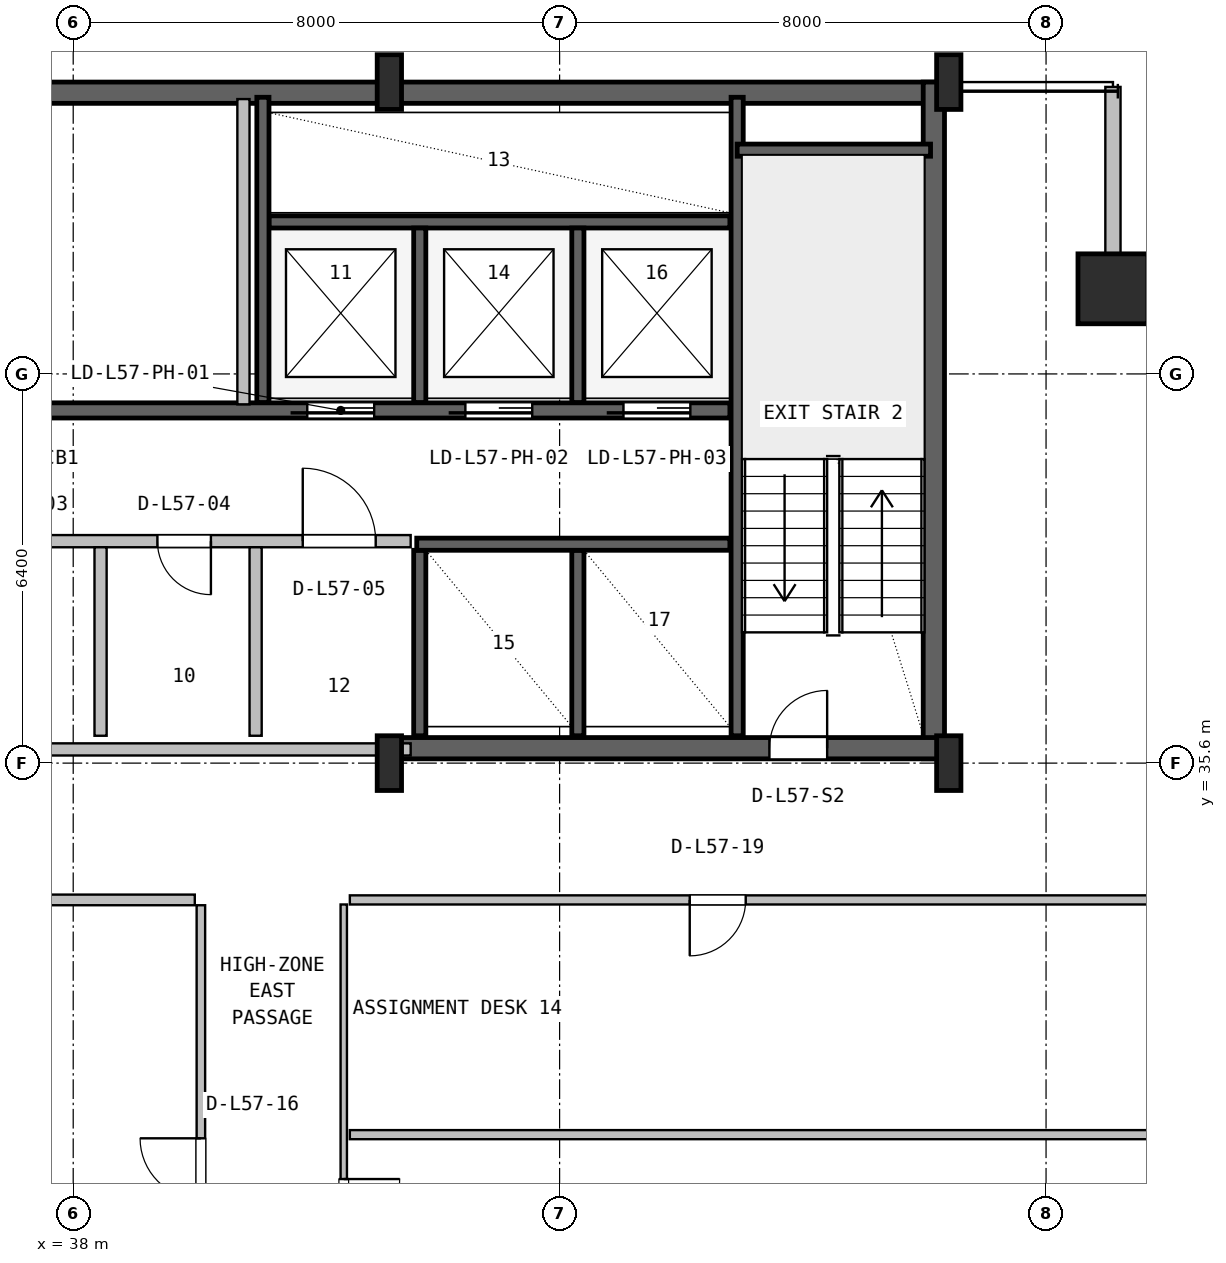
"""IFC4 building model, lengths in metres.
Left out: names, types, materials, properties, quantities, classifications, styles, units other than length and angle.
Written with IfcOpenShell. Run it as: python <this file> out.ifc"""

import sys

from ifc_helpers import new_model, si_unit, direction, frame, frame_2d, origin, origin_2d, place, context, subcontext, project, spatial, rectangle, hollow_rectangle, i_section, extrude, source, transform, mapped, element, fill, save


model = new_model("IFC4")
c1 = context("Model", 3, precision=1e-05, world=origin(), true_north=direction((0.0, 1.0)))
c2 = subcontext(c1, "Body", "Model", "MODEL_VIEW")
j1 = project(units=[si_unit("LENGTHUNIT", "METRE"), si_unit("PLANEANGLEUNIT", "RADIAN")], contexts=[c1])
p1 = place(None, origin())
s1 = spatial("IfcSite", under=j1, at=p1, CompositionType="ELEMENT")
p2 = place(p1, origin())
s2 = spatial("IfcBuilding", under=s1, at=p2, CompositionType="ELEMENT")
p3 = place(p2, frame((0.0, 0.0, 230.2)))
s3 = spatial("IfcBuildingStorey", under=s2, at=p3, CompositionType="ELEMENT", Elevation=230.2)
p4 = place(p3, frame((15.6, 46.625, 0.0), z_axis=(0.0, 0.0, 1.0), x_axis=(1.0, 0.0, 0.0)))
e1 = element("IfcWall", 1, at=p4, inside=s3, PredefinedType="SHEAR", context=c2, shape_type="SweptSolid", body=[
    extrude(rectangle(XDim=36.8, YDim=0.35, at=frame_2d((18.4, 0.0))), origin(), (0.0, 0.0, 1.0), 3.48),
])
p5 = place(p3, frame((52.155, 35.67, 0.0), z_axis=(0.0, 0.0, 1.0), x_axis=(0.0, 1.0, 0.0)))
e2 = element("IfcWall", 2, at=p5, inside=s3, PredefinedType="SHEAR", context=c2, shape_type="SweptSolid", body=[
    extrude(rectangle(XDim=11.13, YDim=0.35, at=frame_2d((5.565, 0.0))), origin(), (0.0, 0.0, 1.0), 3.48),
])
p6 = place(p3, frame((43.2, 35.845, 0.0), z_axis=(0.0, 0.0, 1.0), x_axis=(1.0, 0.0, 0.0)))
e3 = element("IfcWall", 3, at=p6, inside=s3, PredefinedType="SHEAR", context=c2, shape_type="SweptSolid", body=[
    extrude(rectangle(XDim=9.13, YDim=0.35, at=frame_2d((4.565, 0.0))), origin(), (0.0, 0.0, 1.0), 3.48),
])
p7 = place(p6, frame((6.25, 0.0, 0.0)))
e4 = element("IfcOpeningElement", 4, at=p7, cuts=e3, PredefinedType="OPENING", context=c2, shape_type="SweptSolid", body=[
    extrude(rectangle(XDim=0.95, YDim=2.1, at=frame_2d((0.475, 1.05))), frame((0.0, 0.185, 0.0), z_axis=(0.0, -1.0, 0.0), x_axis=(1.0, 0.0, 0.0)), (0.0, 0.0, 1.0), 0.37),
])
m1 = source(origin(), c2, "Body", "SweptSolid", [
    extrude(i_section(OverallWidth=0.4, OverallDepth=0.9, WebThickness=0.016, FlangeThickness=0.028, FilletRadius=0.016, at=origin_2d()), origin(), (0.0, 0.0, 1.0), 3.8),
])
for number, where, z_axis, x_axis in (
    (5, (43.2, 35.6, 0.0), (0.0, 0.0, 1.0), (1.0, 0.0, 0.0)),
    (6, (43.2, 46.8, 0.0), (0.0, 0.0, 1.0), (1.0, 0.0, 0.0)),
    (7, (52.4, 35.6, 0.0), (0.0, 0.0, 1.0), (1.0, 0.0, 0.0)),
    (8, (52.4, 46.8, 0.0), (0.0, 0.0, 1.0), (1.0, 0.0, 0.0)),
):
    element("IfcColumn", number, at=place(p3, frame(where, z_axis=z_axis, x_axis=x_axis)), inside=s3, PredefinedType="COLUMN", context=c2, shape_type="MappedRepresentation", body=[
        mapped(m1, transform((0.0, 0.0, 0.0), x_axis=(1.0, 0.0, 0.0), y_axis=(0.0, 1.0, 0.0), z_axis=(0.0, 0.0, 1.0), scale=1.0)),
    ])
m2 = source(origin(), c2, "Body", "SweptSolid", [
    extrude(hollow_rectangle(XDim=1.15, YDim=1.15, WallThickness=0.045, at=origin_2d()), origin(), (0.0, 0.0, 1.0), 3.8),
])
p8 = place(p3, frame((55.1, 43.4, 0.0), z_axis=(0.0, 0.0, 1.0), x_axis=(1.0, 0.0, 0.0)))
e9 = element("IfcColumn", 9, at=p8, inside=s3, PredefinedType="COLUMN", context=c2, shape_type="MappedRepresentation", body=[
    mapped(m2, transform((0.0, 0.0, 0.0), x_axis=(1.0, 0.0, 0.0), y_axis=(0.0, 1.0, 0.0), z_axis=(0.0, 0.0, 1.0), scale=1.0)),
])
p9 = place(p3, frame((55.23, 43.4, 0.0), z_axis=(0.0, 0.0, 1.0), x_axis=(1.0, 0.0, 0.0)))
e10 = element("IfcWall", 10, at=p9, inside=s3, PredefinedType="SOLIDWALL", context=c2, shape_type="SweptSolid", body=[
    extrude(rectangle(XDim=3.19, YDim=0.25, at=frame_2d((1.595, 0.0))), origin(), (0.0, 0.0, 1.0), 3.46),
])
p10 = place(p3, frame((55.1, 43.32, 0.0), z_axis=(0.0, 0.0, 1.0), x_axis=(0.0, 1.0, 0.0)))
e11 = element("IfcWall", 11, at=p10, inside=s3, PredefinedType="SOLIDWALL", context=c2, shape_type="SweptSolid", body=[
    extrude(rectangle(XDim=3.4, YDim=0.25, at=frame_2d((1.7, 0.0))), origin(), (0.0, 0.0, 1.0), 3.101),
])
p11 = place(p3, frame((48.92, 36.05, 0.0), z_axis=(0.0, 0.0, 1.0), x_axis=(0.0, 1.0, 0.0)))
e12 = element("IfcWall", 12, at=p11, inside=s3, PredefinedType="SHEAR", context=c2, shape_type="SweptSolid", body=[
    extrude(rectangle(XDim=10.5, YDim=0.2, at=frame_2d((5.25, 0.0))), origin(), (0.0, 0.0, 1.0), 3.48),
])
p12 = place(p3, frame((48.92, 45.68, 0.0), z_axis=(0.0, 0.0, 1.0), x_axis=(1.0, 0.0, 0.0)))
e13 = element("IfcWall", 13, at=p12, inside=s3, PredefinedType="SHEAR", context=c2, shape_type="SweptSolid", body=[
    extrude(rectangle(XDim=3.18, YDim=0.2, at=frame_2d((1.59, 0.0))), origin(), (0.0, 0.0, 1.0), 3.48),
])
p13 = place(p3, frame((24.98, 41.4, 0.0), z_axis=(0.0, 0.0, 1.0), x_axis=(1.0, 0.0, 0.0)))
e14 = element("IfcWall", 14, at=p13, inside=s3, PredefinedType="SHEAR", context=c2, shape_type="SweptSolid", body=[
    extrude(rectangle(XDim=23.82, YDim=0.25, at=frame_2d((11.91, 0.0))), origin(), (0.0, 0.0, 1.0), 3.48),
])
p14 = place(p13, frame((16.87, 0.0, 0.0)))
e15 = element("IfcOpeningElement", 15, at=p14, cuts=e14, PredefinedType="OPENING", context=c2, shape_type="SweptSolid", body=[
    extrude(rectangle(XDim=1.1, YDim=2.18, at=frame_2d((0.55, 1.09))), frame((0.0, 0.135, 0.0), z_axis=(0.0, -1.0, 0.0), x_axis=(1.0, 0.0, 0.0)), (0.0, 0.0, 1.0), 0.27),
])
p15 = place(p13, frame((19.47, 0.0, 0.0)))
e16 = element("IfcOpeningElement", 16, at=p15, cuts=e14, PredefinedType="OPENING", context=c2, shape_type="SweptSolid", body=[
    extrude(rectangle(XDim=1.1, YDim=2.18, at=frame_2d((0.55, 1.09))), frame((0.0, 0.135, 0.0), z_axis=(0.0, -1.0, 0.0), x_axis=(1.0, 0.0, 0.0)), (0.0, 0.0, 1.0), 0.27),
])
p16 = place(p13, frame((22.07, 0.0, 0.0)))
e17 = element("IfcOpeningElement", 17, at=p16, cuts=e14, PredefinedType="OPENING", context=c2, shape_type="SweptSolid", body=[
    extrude(rectangle(XDim=1.1, YDim=2.18, at=frame_2d((0.55, 1.09))), frame((0.0, 0.135, 0.0), z_axis=(0.0, -1.0, 0.0), x_axis=(1.0, 0.0, 0.0)), (0.0, 0.0, 1.0), 0.27),
])
p17 = place(p13, frame((0.96, 0.0, 0.0)))
e18 = element("IfcOpeningElement", 18, at=p17, cuts=e14, PredefinedType="OPENING", context=c2, shape_type="SweptSolid", body=[
    extrude(rectangle(XDim=1.0, YDim=2.08, at=frame_2d((0.5, 1.04))), frame((0.0, 0.135, 0.0), z_axis=(0.0, -1.0, 0.0), x_axis=(1.0, 0.0, 0.0)), (0.0, 0.0, 1.0), 0.27),
])
p18 = place(p13, frame((3.56, 0.0, 0.0)))
e19 = element("IfcOpeningElement", 19, at=p18, cuts=e14, PredefinedType="OPENING", context=c2, shape_type="SweptSolid", body=[
    extrude(rectangle(XDim=1.0, YDim=2.08, at=frame_2d((0.5, 1.04))), frame((0.0, 0.135, 0.0), z_axis=(0.0, -1.0, 0.0), x_axis=(1.0, 0.0, 0.0)), (0.0, 0.0, 1.0), 0.27),
])
p19 = place(p13, frame((6.16, 0.0, 0.0)))
e20 = element("IfcOpeningElement", 20, at=p19, cuts=e14, PredefinedType="OPENING", context=c2, shape_type="SweptSolid", body=[
    extrude(rectangle(XDim=0.92, YDim=2.08, at=frame_2d((0.46, 1.04))), frame((0.0, 0.135, 0.0), z_axis=(0.0, -1.0, 0.0), x_axis=(1.0, 0.0, 0.0)), (0.0, 0.0, 1.0), 0.27),
])
p20 = place(p13, frame((11.56, 0.0, 0.0)))
e21 = element("IfcOpeningElement", 21, at=p20, cuts=e14, PredefinedType="OPENING", context=c2, shape_type="SweptSolid", body=[
    extrude(rectangle(XDim=1.0, YDim=2.08, at=frame_2d((0.5, 1.04))), frame((0.0, 0.135, 0.0), z_axis=(0.0, -1.0, 0.0), x_axis=(1.0, 0.0, 0.0)), (0.0, 0.0, 1.0), 0.27),
])
p21 = place(p3, frame((41.22, 44.5, 0.0), z_axis=(0.0, 0.0, 1.0), x_axis=(1.0, 0.0, 0.0)))
e22 = element("IfcWall", 22, at=p21, inside=s3, PredefinedType="SHEAR", context=c2, shape_type="SweptSolid", body=[
    extrude(rectangle(XDim=7.58, YDim=0.2, at=frame_2d((3.79, 0.0))), origin(), (0.0, 0.0, 1.0), 3.48),
])
p22 = place(p3, frame((41.12, 41.53, 0.0), z_axis=(0.0, 0.0, 1.0), x_axis=(0.0, 1.0, 0.0)))
e23 = element("IfcWall", 23, at=p22, inside=s3, PredefinedType="SHEAR", context=c2, shape_type="SweptSolid", body=[
    extrude(rectangle(XDim=5.02, YDim=0.2, at=frame_2d((2.51, 0.0))), origin(), (0.0, 0.0, 1.0), 3.48),
])
for number, where, z_axis, x_axis in (
    (24, (43.7, 41.53, 0.0), (0.0, 0.0, 1.0), (0.0, 1.0, 0.0)),
    (25, (46.3, 41.53, 0.0), (0.0, 0.0, 1.0), (0.0, 1.0, 0.0)),
):
    element("IfcWall", number, at=place(p3, frame(where, z_axis=z_axis, x_axis=x_axis)), inside=s3, PredefinedType="SHEAR", context=c2, shape_type="SweptSolid", body=[
        extrude(rectangle(XDim=2.87, YDim=0.2, at=frame_2d((1.435, 0.0))), origin(), (0.0, 0.0, 1.0), 3.48),
    ])
for number, where, z_axis, x_axis in (
    (26, (43.7, 36.05, 0.0), (0.0, 0.0, 1.0), (0.0, 1.0, 0.0)),
    (27, (46.3, 36.05, 0.0), (0.0, 0.0, 1.0), (0.0, 1.0, 0.0)),
):
    element("IfcWall", number, at=place(p3, frame(where, z_axis=z_axis, x_axis=x_axis)), inside=s3, PredefinedType="SHEAR", context=c2, shape_type="SweptSolid", body=[
        extrude(rectangle(XDim=3.05, YDim=0.2, at=frame_2d((1.525, 0.0))), origin(), (0.0, 0.0, 1.0), 3.48),
    ])
p23 = place(p3, frame((43.65, 39.2, 0.0), z_axis=(0.0, 0.0, 1.0), x_axis=(1.0, 0.0, 0.0)))
e28 = element("IfcWall", 28, at=p23, inside=s3, PredefinedType="SHEAR", context=c2, shape_type="SweptSolid", body=[
    extrude(rectangle(XDim=5.15, YDim=0.2, at=frame_2d((2.575, 0.0))), origin(), (0.0, 0.0, 1.0), 3.48),
])
p24 = place(p3, frame((29.85, 35.825, 0.0), z_axis=(0.0, 0.0, 1.0), x_axis=(1.0, 0.0, 0.0)))
e29 = element("IfcWall", 29, at=p24, inside=s3, PredefinedType="SOLIDWALL", context=c2, shape_type="SweptSolid", body=[
    extrude(rectangle(XDim=13.7, YDim=0.2, at=frame_2d((6.85, 0.0))), origin(), (0.0, 0.0, 1.0), 2.505),
])
p25 = place(p3, frame((29.85, 39.25, 0.0), z_axis=(0.0, 0.0, 1.0), x_axis=(1.0, 0.0, 0.0)))
e30 = element("IfcWall", 30, at=p25, inside=s3, PredefinedType="SOLIDWALL", context=c2, shape_type="SweptSolid", body=[
    extrude(rectangle(XDim=13.7, YDim=0.2, at=frame_2d((6.85, 0.0))), origin(), (0.0, 0.0, 1.0), 3.46),
])
p26 = place(p25, frame((1.05, 0.0, 0.0)))
e31 = element("IfcOpeningElement", 31, at=p26, cuts=e30, PredefinedType="OPENING", context=c2, shape_type="SweptSolid", body=[
    extrude(rectangle(XDim=0.9, YDim=2.06, at=frame_2d((0.45, 1.03))), frame((0.0, 0.11, 0.0), z_axis=(0.0, -1.0, 0.0), x_axis=(1.0, 0.0, 0.0)), (0.0, 0.0, 1.0), 0.22),
])
p27 = place(p25, frame((4.05, 0.0, 0.0)))
e32 = element("IfcOpeningElement", 32, at=p27, cuts=e30, PredefinedType="OPENING", context=c2, shape_type="SweptSolid", body=[
    extrude(rectangle(XDim=0.9, YDim=2.06, at=frame_2d((0.45, 1.03))), frame((0.0, 0.11, 0.0), z_axis=(0.0, -1.0, 0.0), x_axis=(1.0, 0.0, 0.0)), (0.0, 0.0, 1.0), 0.22),
])
p28 = place(p25, frame((6.85, 0.0, 0.0)))
e33 = element("IfcOpeningElement", 33, at=p28, cuts=e30, PredefinedType="OPENING", context=c2, shape_type="SweptSolid", body=[
    extrude(rectangle(XDim=0.9, YDim=2.06, at=frame_2d((0.45, 1.03))), frame((0.0, 0.11, 0.0), z_axis=(0.0, -1.0, 0.0), x_axis=(1.0, 0.0, 0.0)), (0.0, 0.0, 1.0), 0.22),
])
p29 = place(p25, frame((9.535, 0.0, 0.0)))
e34 = element("IfcOpeningElement", 34, at=p29, cuts=e30, PredefinedType="OPENING", context=c2, shape_type="SweptSolid", body=[
    extrude(rectangle(XDim=0.88, YDim=2.06, at=frame_2d((0.44, 1.03))), frame((0.0, 0.11, 0.0), z_axis=(0.0, -1.0, 0.0), x_axis=(1.0, 0.0, 0.0)), (0.0, 0.0, 1.0), 0.22),
])
p30 = place(p25, frame((11.925, 0.0, 0.0)))
e35 = element("IfcOpeningElement", 35, at=p30, cuts=e30, PredefinedType="OPENING", context=c2, shape_type="SweptSolid", body=[
    extrude(rectangle(XDim=1.2, YDim=2.1, at=frame_2d((0.6, 1.05))), frame((0.0, 0.11, 0.0), z_axis=(0.0, -1.0, 0.0), x_axis=(1.0, 0.0, 0.0)), (0.0, 0.0, 1.0), 0.22),
])
p31 = place(p3, frame((38.45, 36.05, 0.0), z_axis=(0.0, 0.0, 1.0), x_axis=(0.0, 1.0, 0.0)))
e36 = element("IfcWall", 36, at=p31, inside=s3, PredefinedType="PLUMBINGWALL", context=c2, shape_type="SweptSolid", body=[
    extrude(rectangle(XDim=3.1, YDim=0.2, at=frame_2d((1.55, 0.0))), origin(), (0.0, 0.0, 1.0), 3.46),
])
p32 = place(p3, frame((41.0, 36.05, 0.0), z_axis=(0.0, 0.0, 1.0), x_axis=(0.0, 1.0, 0.0)))
e37 = element("IfcWall", 37, at=p32, inside=s3, PredefinedType="SOLIDWALL", context=c2, shape_type="SweptSolid", body=[
    extrude(rectangle(XDim=3.1, YDim=0.2, at=frame_2d((1.55, 0.0))), origin(), (0.0, 0.0, 1.0), 3.46),
])
p33 = place(p3, frame((28.5, 33.35, 0.0), z_axis=(0.0, 0.0, 1.0), x_axis=(1.0, 0.0, 0.0)))
e38 = element("IfcWall", 38, at=p33, inside=s3, PredefinedType="PARTITIONING", context=c2, shape_type="SweptSolid", body=[
    extrude(rectangle(XDim=11.5, YDim=0.175, at=frame_2d((5.75, 0.0))), origin(), (0.0, 0.0, 1.0), 2.838),
])
p34 = place(p3, frame((40.1, 24.598, 0.0), z_axis=(0.0, 0.0, 1.0), x_axis=(0.0, 1.0, 0.0)))
e39 = element("IfcWall", 39, at=p34, inside=s3, PredefinedType="PARTITIONING", context=c2, shape_type="SweptSolid", body=[
    extrude(rectangle(XDim=8.665, YDim=0.14, at=frame_2d((4.333, 0.0))), origin(), (0.0, 0.0, 1.0), 3.152),
])
p35 = place(p34, frame((3.832, 0.0, 0.0)))
e40 = element("IfcOpeningElement", 40, at=p35, cuts=e39, PredefinedType="OPENING", context=c2, shape_type="SweptSolid", body=[
    extrude(rectangle(XDim=1.0, YDim=2.1, at=frame_2d((0.5, 1.05))), frame((0.0, 0.08, 0.0), z_axis=(0.0, -1.0, 0.0), x_axis=(1.0, 0.0, 0.0)), (0.0, 0.0, 1.0), 0.16),
])
p36 = place(p3, frame((42.45, 22.235, 0.0), z_axis=(0.0, 0.0, 1.0), x_axis=(0.0, 1.0, 0.0)))
e41 = element("IfcWall", 41, at=p36, inside=s3, PredefinedType="PARTITIONING", context=c2, shape_type="SweptSolid", body=[
    extrude(rectangle(XDim=11.04, YDim=0.105, at=frame_2d((5.52, 0.0))), origin(), (0.0, 0.0, 1.0), 2.838),
])
p37 = place(p36, frame((2.57, 0.0, 0.0)))
e42 = element("IfcOpeningElement", 42, at=p37, cuts=e41, PredefinedType="OPENING", context=c2, shape_type="SweptSolid", body=[
    extrude(rectangle(XDim=0.88, YDim=2.06, at=frame_2d((0.44, 1.03))), frame((0.0, 0.062, 0.0), z_axis=(0.0, -1.0, 0.0), x_axis=(1.0, 0.0, 0.0)), (0.0, 0.0, 1.0), 0.125),
])
p38 = place(p36, frame((5.605, 0.0, 0.0)))
e43 = element("IfcOpeningElement", 43, at=p38, cuts=e41, PredefinedType="OPENING", context=c2, shape_type="SweptSolid", body=[
    extrude(rectangle(XDim=0.92, YDim=2.08, at=frame_2d((0.46, 1.04))), frame((0.0, 0.062, 0.0), z_axis=(0.0, -1.0, 0.0), x_axis=(1.0, 0.0, 0.0)), (0.0, 0.0, 1.0), 0.125),
])
p39 = place(p3, frame((42.55, 29.49, 0.0), z_axis=(0.0, 0.0, 1.0), x_axis=(1.0, 0.0, 0.0)))
e44 = element("IfcWall", 44, at=p39, inside=s3, PredefinedType="PARTITIONING", context=c2, shape_type="SweptSolid", body=[
    extrude(rectangle(XDim=15.77, YDim=0.15, at=frame_2d((7.885, 0.0))), origin(), (0.0, 0.0, 1.0), 2.838),
])
p40 = place(p3, frame((42.55, 33.35, 0.0), z_axis=(0.0, 0.0, 1.0), x_axis=(1.0, 0.0, 0.0)))
e45 = element("IfcWall", 45, at=p40, inside=s3, PredefinedType="PARTITIONING", context=c2, shape_type="SweptSolid", body=[
    extrude(rectangle(XDim=15.77, YDim=0.15, at=frame_2d((7.885, 0.0))), origin(), (0.0, 0.0, 1.0), 2.838),
])
p41 = place(p40, frame((5.59, 0.0, 0.0)))
e46 = element("IfcOpeningElement", 46, at=p41, cuts=e45, PredefinedType="OPENING", context=c2, shape_type="SweptSolid", body=[
    extrude(rectangle(XDim=0.92, YDim=2.08, at=frame_2d((0.46, 1.04))), frame((0.0, 0.085, 0.0), z_axis=(0.0, -1.0, 0.0), x_axis=(1.0, 0.0, 0.0)), (0.0, 0.0, 1.0), 0.17),
])
p42 = place(p3, frame((40.8, 41.5, 0.0), z_axis=(0.0, 0.0, 1.0), x_axis=(0.0, 1.0, 0.0)))
e47 = element("IfcWall", 47, at=p42, inside=s3, PredefinedType="SOLIDWALL", context=c2, shape_type="SweptSolid", body=[
    extrude(rectangle(XDim=5.02, YDim=0.2, at=frame_2d((2.51, 0.0))), origin(), (0.0, 0.0, 1.0), 3.46),
])
m3 = source(origin(), c2, "Body", "SweptSolid", [
    extrude(rectangle(XDim=0.95, YDim=2.1, at=frame_2d((0.475, 1.05))), frame((0.0, 0.025, 0.0), z_axis=(0.0, -1.0, 0.0), x_axis=(1.0, 0.0, 0.0)), (0.0, 0.0, 1.0), 0.05),
])
p43 = place(p7, origin())
e48 = element("IfcDoor", 48, at=p43, inside=s3, OperationType="SINGLE_SWING_RIGHT", PredefinedType="DOOR", context=c2, shape_type="MappedRepresentation", body=[
    mapped(m3, transform((0.0, 0.0, 0.0), x_axis=(1.0, 0.0, 0.0), y_axis=(0.0, 1.0, 0.0), z_axis=(0.0, 0.0, 1.0), scale=1.0)),
])
fill(e4, e48)
m4 = source(origin(), c2, "Body", "SweptSolid", [
    extrude(rectangle(XDim=1.1, YDim=2.18, at=frame_2d((0.55, 1.09))), frame((0.0, 0.025, 0.0), z_axis=(0.0, -1.0, 0.0), x_axis=(1.0, 0.0, 0.0)), (0.0, 0.0, 1.0), 0.05),
])
p44 = place(p14, frame((1.1, 0.0, 0.0), z_axis=(0.0, 0.0, 1.0), x_axis=(-1.0, 0.0, 0.0)))
e49 = element("IfcDoor", 49, at=p44, inside=s3, OperationType="SLIDING_TO_LEFT", PredefinedType="DOOR", context=c2, shape_type="MappedRepresentation", body=[
    mapped(m4, transform((0.0, 0.0, 0.0), x_axis=(1.0, 0.0, 0.0), y_axis=(0.0, 1.0, 0.0), z_axis=(0.0, 0.0, 1.0), scale=1.0)),
])
fill(e15, e49)
p45 = place(p15, frame((1.1, 0.0, 0.0), z_axis=(0.0, 0.0, 1.0), x_axis=(-1.0, 0.0, 0.0)))
e50 = element("IfcDoor", 50, at=p45, inside=s3, OperationType="SLIDING_TO_LEFT", PredefinedType="DOOR", context=c2, shape_type="MappedRepresentation", body=[
    mapped(m4, transform((0.0, 0.0, 0.0), x_axis=(1.0, 0.0, 0.0), y_axis=(0.0, 1.0, 0.0), z_axis=(0.0, 0.0, 1.0), scale=1.0)),
])
fill(e16, e50)
p46 = place(p16, frame((1.1, 0.0, 0.0), z_axis=(0.0, 0.0, 1.0), x_axis=(-1.0, 0.0, 0.0)))
e51 = element("IfcDoor", 51, at=p46, inside=s3, OperationType="SLIDING_TO_LEFT", PredefinedType="DOOR", context=c2, shape_type="MappedRepresentation", body=[
    mapped(m4, transform((0.0, 0.0, 0.0), x_axis=(1.0, 0.0, 0.0), y_axis=(0.0, 1.0, 0.0), z_axis=(0.0, 0.0, 1.0), scale=1.0)),
])
fill(e17, e51)
m5 = source(origin(), c2, "Body", "SweptSolid", [
    extrude(rectangle(XDim=0.88, YDim=2.06, at=frame_2d((0.44, 1.03))), frame((0.0, 0.025, 0.0), z_axis=(0.0, -1.0, 0.0), x_axis=(1.0, 0.0, 0.0)), (0.0, 0.0, 1.0), 0.05),
])
p47 = place(p29, frame((0.88, 0.0, 0.0), z_axis=(0.0, 0.0, 1.0), x_axis=(-1.0, 0.0, 0.0)))
e52 = element("IfcDoor", 52, at=p47, inside=s3, OperationType="SINGLE_SWING_RIGHT", PredefinedType="DOOR", context=c2, shape_type="MappedRepresentation", body=[
    mapped(m5, transform((0.0, 0.0, 0.0), x_axis=(1.0, 0.0, 0.0), y_axis=(0.0, 1.0, 0.0), z_axis=(0.0, 0.0, 1.0), scale=1.0)),
])
fill(e34, e52)
m6 = source(origin(), c2, "Body", "SweptSolid", [
    extrude(rectangle(XDim=1.2, YDim=2.1, at=frame_2d((0.6, 1.05))), frame((0.0, 0.025, 0.0), z_axis=(0.0, -1.0, 0.0), x_axis=(1.0, 0.0, 0.0)), (0.0, 0.0, 1.0), 0.05),
])
p48 = place(p30, origin())
e53 = element("IfcDoor", 53, at=p48, inside=s3, OperationType="SINGLE_SWING_LEFT", PredefinedType="DOOR", context=c2, shape_type="MappedRepresentation", body=[
    mapped(m6, transform((0.0, 0.0, 0.0), x_axis=(1.0, 0.0, 0.0), y_axis=(0.0, 1.0, 0.0), z_axis=(0.0, 0.0, 1.0), scale=1.0)),
])
fill(e35, e53)
m7 = source(origin(), c2, "Body", "SweptSolid", [
    extrude(rectangle(XDim=1.0, YDim=2.1, at=frame_2d((0.5, 1.05))), frame((0.0, 0.025, 0.0), z_axis=(0.0, -1.0, 0.0), x_axis=(1.0, 0.0, 0.0)), (0.0, 0.0, 1.0), 0.05),
])
p49 = place(p35, origin())
e54 = element("IfcDoor", 54, at=p49, inside=s3, OperationType="SINGLE_SWING_RIGHT", PredefinedType="DOOR", context=c2, shape_type="MappedRepresentation", body=[
    mapped(m7, transform((0.0, 0.0, 0.0), x_axis=(1.0, 0.0, 0.0), y_axis=(0.0, 1.0, 0.0), z_axis=(0.0, 0.0, 1.0), scale=1.0)),
])
fill(e40, e54)
m8 = source(origin(), c2, "Body", "SweptSolid", [
    extrude(rectangle(XDim=0.92, YDim=2.08, at=frame_2d((0.46, 1.04))), frame((0.0, 0.025, 0.0), z_axis=(0.0, -1.0, 0.0), x_axis=(1.0, 0.0, 0.0)), (0.0, 0.0, 1.0), 0.05),
])
p50 = place(p38, frame((0.92, 0.0, 0.0), z_axis=(0.0, 0.0, 1.0), x_axis=(-1.0, 0.0, 0.0)))
e55 = element("IfcDoor", 55, at=p50, inside=s3, OperationType="SINGLE_SWING_RIGHT", PredefinedType="DOOR", context=c2, shape_type="MappedRepresentation", body=[
    mapped(m8, transform((0.0, 0.0, 0.0), x_axis=(1.0, 0.0, 0.0), y_axis=(0.0, 1.0, 0.0), z_axis=(0.0, 0.0, 1.0), scale=1.0)),
])
fill(e43, e55)
p51 = place(p41, frame((0.92, 0.0, 0.0), z_axis=(0.0, 0.0, 1.0), x_axis=(-1.0, 0.0, 0.0)))
e56 = element("IfcDoor", 56, at=p51, inside=s3, OperationType="SINGLE_SWING_LEFT", PredefinedType="DOOR", context=c2, shape_type="MappedRepresentation", body=[
    mapped(m8, transform((0.0, 0.0, 0.0), x_axis=(1.0, 0.0, 0.0), y_axis=(0.0, 1.0, 0.0), z_axis=(0.0, 0.0, 1.0), scale=1.0)),
])
fill(e46, e56)
save(model, sys.argv[1])
